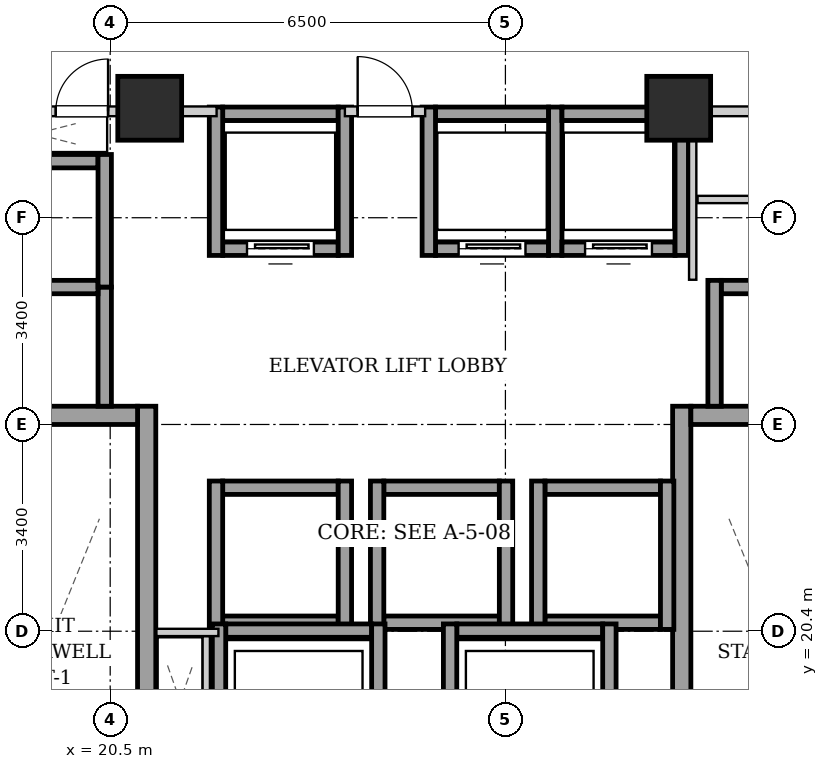
"""IFC4 building model, lengths in metres.
Left out: names, types, materials, properties, quantities, classifications, styles, units other than length and angle.
Written with IfcOpenShell. Run it as: python <this file> out.ifc"""

import sys

from ifc_helpers import new_model, si_unit, direction, frame, frame_2d, origin, origin_2d, place, context, subcontext, project, spatial, rectangle, extrude, element, fill, save


model = new_model("IFC4")
c1 = context("Model", 3, precision=1e-05, world=origin(), true_north=direction((0.0, 1.0)))
c2 = subcontext(c1, "Body", "Model", "MODEL_VIEW")
j1 = project(units=[si_unit("LENGTHUNIT", "METRE"), si_unit("PLANEANGLEUNIT", "RADIAN")], contexts=[c1])
p1 = place(None, origin())
s1 = spatial("IfcSite", under=j1, at=p1, CompositionType="ELEMENT")
p2 = place(p1, origin())
s2 = spatial("IfcBuilding", under=s1, at=p2, CompositionType="ELEMENT")
p3 = place(p2, frame((0.0, 0.0, 78.3)))
s3 = spatial("IfcBuildingStorey", under=s2, at=p3, CompositionType="ELEMENT", Elevation=78.3)
for number, where, z_axis, x_axis in (
    (1, (21.15, 29.0, 0.0), (0.0, 0.0, 1.0), (1.0, 0.0, 0.0)),
    (2, (29.85, 29.0, 0.0), (0.0, 0.0, 1.0), (1.0, 0.0, 0.0)),
):
    element("IfcColumn", number, at=place(p3, frame(where, z_axis=z_axis, x_axis=x_axis)), inside=s3, PredefinedType="COLUMN", context=c2, shape_type="SweptSolid", body=[
        extrude(rectangle(XDim=1.05, YDim=1.05, at=origin_2d()), origin(), (0.0, 0.0, 1.0), 3.2),
    ])
p4 = place(p3, frame((21.1, 15.1, 0.0), z_axis=(0.0, 0.0, 1.0), x_axis=(0.0, 1.0, 0.0)))
e3 = element("IfcWall", 3, at=p4, inside=s3, PredefinedType="SHEAR", context=c2, shape_type="SweptSolid", body=[
    extrude(rectangle(XDim=9.0, YDim=0.3, at=frame_2d((4.5, 0.0))), origin(), (0.0, 0.0, 1.0), 2.94),
])
p5 = place(p3, frame((18.1, 23.95, 0.0), z_axis=(0.0, 0.0, 1.0), x_axis=(1.0, 0.0, 0.0)))
e4 = element("IfcWall", 4, at=p5, inside=s3, PredefinedType="SHEAR", context=c2, shape_type="SweptSolid", body=[
    extrude(rectangle(XDim=2.85, YDim=0.3, at=frame_2d((1.425, 0.0))), origin(), (0.0, 0.0, 1.0), 2.94),
])
p6 = place(p3, frame((29.9, 15.1, 0.0), z_axis=(0.0, 0.0, 1.0), x_axis=(0.0, 1.0, 0.0)))
e5 = element("IfcWall", 5, at=p6, inside=s3, PredefinedType="SHEAR", context=c2, shape_type="SweptSolid", body=[
    extrude(rectangle(XDim=9.0, YDim=0.3, at=frame_2d((4.5, 0.0))), origin(), (0.0, 0.0, 1.0), 2.94),
])
p7 = place(p3, frame((30.05, 23.95, 0.0), z_axis=(0.0, 0.0, 1.0), x_axis=(1.0, 0.0, 0.0)))
e6 = element("IfcWall", 6, at=p7, inside=s3, PredefinedType="SHEAR", context=c2, shape_type="SweptSolid", body=[
    extrude(rectangle(XDim=2.85, YDim=0.3, at=frame_2d((1.425, 0.0))), origin(), (0.0, 0.0, 1.0), 2.94),
])
p8 = place(p3, frame((22.35, 26.69, 0.0), z_axis=(0.0, 0.0, 1.0), x_axis=(1.0, 0.0, 0.0)))
e7 = element("IfcWall", 7, at=p8, inside=s3, PredefinedType="SHEAR", context=c2, shape_type="SweptSolid", body=[
    extrude(rectangle(XDim=1.9, YDim=0.22, at=frame_2d((0.95, 0.0))), origin(), (0.0, 0.0, 1.0), 2.94),
])
p9 = place(p8, frame((0.4, 0.0, 0.0)))
e8 = element("IfcOpeningElement", 8, at=p9, cuts=e7, PredefinedType="OPENING", context=c2, shape_type="SweptSolid", body=[
    extrude(rectangle(XDim=1.1, YDim=2.15, at=frame_2d((0.55, 1.075))), frame((0.0, 0.12, 0.0), z_axis=(0.0, -1.0, 0.0), x_axis=(1.0, 0.0, 0.0)), (0.0, 0.0, 1.0), 0.24),
])
p10 = place(p3, frame((22.35, 28.91, 0.0), z_axis=(0.0, 0.0, 1.0), x_axis=(1.0, 0.0, 0.0)))
e9 = element("IfcWall", 9, at=p10, inside=s3, PredefinedType="SHEAR", context=c2, shape_type="SweptSolid", body=[
    extrude(rectangle(XDim=1.9, YDim=0.22, at=frame_2d((0.95, 0.0))), origin(), (0.0, 0.0, 1.0), 2.94),
])
for number, where, z_axis, x_axis in (
    (10, (22.24, 26.58, 0.0), (0.0, 0.0, 1.0), (0.0, 1.0, 0.0)),
    (11, (24.36, 26.58, 0.0), (0.0, 0.0, 1.0), (0.0, 1.0, 0.0)),
):
    element("IfcWall", number, at=place(p3, frame(where, z_axis=z_axis, x_axis=x_axis)), inside=s3, PredefinedType="SHEAR", context=c2, shape_type="SweptSolid", body=[
        extrude(rectangle(XDim=2.44, YDim=0.22, at=frame_2d((1.22, 0.0))), origin(), (0.0, 0.0, 1.0), 2.94),
    ])
p11 = place(p3, frame((25.85, 26.69, 0.0), z_axis=(0.0, 0.0, 1.0), x_axis=(1.0, 0.0, 0.0)))
e12 = element("IfcWall", 12, at=p11, inside=s3, PredefinedType="SHEAR", context=c2, shape_type="SweptSolid", body=[
    extrude(rectangle(XDim=1.86, YDim=0.22, at=frame_2d((0.93, 0.0))), origin(), (0.0, 0.0, 1.0), 2.94),
])
p12 = place(p11, frame((0.38, 0.0, 0.0)))
e13 = element("IfcOpeningElement", 13, at=p12, cuts=e12, PredefinedType="OPENING", context=c2, shape_type="SweptSolid", body=[
    extrude(rectangle(XDim=1.1, YDim=2.15, at=frame_2d((0.55, 1.075))), frame((0.0, 0.12, 0.0), z_axis=(0.0, -1.0, 0.0), x_axis=(1.0, 0.0, 0.0)), (0.0, 0.0, 1.0), 0.24),
])
p13 = place(p3, frame((25.85, 28.91, 0.0), z_axis=(0.0, 0.0, 1.0), x_axis=(1.0, 0.0, 0.0)))
e14 = element("IfcWall", 14, at=p13, inside=s3, PredefinedType="SHEAR", context=c2, shape_type="SweptSolid", body=[
    extrude(rectangle(XDim=1.86, YDim=0.22, at=frame_2d((0.93, 0.0))), origin(), (0.0, 0.0, 1.0), 2.94),
])
for number, where, z_axis, x_axis in (
    (15, (25.74, 26.58, 0.0), (0.0, 0.0, 1.0), (0.0, 1.0, 0.0)),
    (16, (27.82, 26.58, 0.0), (0.0, 0.0, 1.0), (0.0, 1.0, 0.0)),
):
    element("IfcWall", number, at=place(p3, frame(where, z_axis=z_axis, x_axis=x_axis)), inside=s3, PredefinedType="SHEAR", context=c2, shape_type="SweptSolid", body=[
        extrude(rectangle(XDim=2.44, YDim=0.22, at=frame_2d((1.22, 0.0))), origin(), (0.0, 0.0, 1.0), 2.94),
    ])
p14 = place(p3, frame((27.93, 26.69, 0.0), z_axis=(0.0, 0.0, 1.0), x_axis=(1.0, 0.0, 0.0)))
e17 = element("IfcWall", 17, at=p14, inside=s3, PredefinedType="SHEAR", context=c2, shape_type="SweptSolid", body=[
    extrude(rectangle(XDim=1.86, YDim=0.22, at=frame_2d((0.93, 0.0))), origin(), (0.0, 0.0, 1.0), 2.94),
])
p15 = place(p14, frame((0.38, 0.0, 0.0)))
e18 = element("IfcOpeningElement", 18, at=p15, cuts=e17, PredefinedType="OPENING", context=c2, shape_type="SweptSolid", body=[
    extrude(rectangle(XDim=1.1, YDim=2.15, at=frame_2d((0.55, 1.075))), frame((0.0, 0.12, 0.0), z_axis=(0.0, -1.0, 0.0), x_axis=(1.0, 0.0, 0.0)), (0.0, 0.0, 1.0), 0.24),
])
p16 = place(p3, frame((27.93, 28.91, 0.0), z_axis=(0.0, 0.0, 1.0), x_axis=(1.0, 0.0, 0.0)))
e19 = element("IfcWall", 19, at=p16, inside=s3, PredefinedType="SHEAR", context=c2, shape_type="SweptSolid", body=[
    extrude(rectangle(XDim=1.86, YDim=0.22, at=frame_2d((0.93, 0.0))), origin(), (0.0, 0.0, 1.0), 2.94),
])
p17 = place(p3, frame((29.9, 26.58, 0.0), z_axis=(0.0, 0.0, 1.0), x_axis=(0.0, 1.0, 0.0)))
e20 = element("IfcWall", 20, at=p17, inside=s3, PredefinedType="SHEAR", context=c2, shape_type="SweptSolid", body=[
    extrude(rectangle(XDim=2.44, YDim=0.22, at=frame_2d((1.22, 0.0))), origin(), (0.0, 0.0, 1.0), 2.94),
])
for number, where, z_axis, x_axis in (
    (21, (22.35, 20.54, 0.0), (0.0, 0.0, 1.0), (1.0, 0.0, 0.0)),
    (22, (22.35, 22.76, 0.0), (0.0, 0.0, 1.0), (1.0, 0.0, 0.0)),
):
    element("IfcWall", number, at=place(p3, frame(where, z_axis=z_axis, x_axis=x_axis)), inside=s3, PredefinedType="SHEAR", context=c2, shape_type="SweptSolid", body=[
        extrude(rectangle(XDim=1.9, YDim=0.22, at=frame_2d((0.95, 0.0))), origin(), (0.0, 0.0, 1.0), 2.94),
    ])
for number, where, z_axis, x_axis in (
    (23, (22.24, 20.43, 0.0), (0.0, 0.0, 1.0), (0.0, 1.0, 0.0)),
    (24, (24.36, 20.43, 0.0), (0.0, 0.0, 1.0), (0.0, 1.0, 0.0)),
):
    element("IfcWall", number, at=place(p3, frame(where, z_axis=z_axis, x_axis=x_axis)), inside=s3, PredefinedType="SHEAR", context=c2, shape_type="SweptSolid", body=[
        extrude(rectangle(XDim=2.44, YDim=0.22, at=frame_2d((1.22, 0.0))), origin(), (0.0, 0.0, 1.0), 2.94),
    ])
for number, where, z_axis, x_axis in (
    (25, (25.0, 20.54, 0.0), (0.0, 0.0, 1.0), (1.0, 0.0, 0.0)),
    (26, (25.0, 22.76, 0.0), (0.0, 0.0, 1.0), (1.0, 0.0, 0.0)),
):
    element("IfcWall", number, at=place(p3, frame(where, z_axis=z_axis, x_axis=x_axis)), inside=s3, PredefinedType="SHEAR", context=c2, shape_type="SweptSolid", body=[
        extrude(rectangle(XDim=1.9, YDim=0.22, at=frame_2d((0.95, 0.0))), origin(), (0.0, 0.0, 1.0), 2.94),
    ])
for number, where, z_axis, x_axis in (
    (27, (24.89, 20.43, 0.0), (0.0, 0.0, 1.0), (0.0, 1.0, 0.0)),
    (28, (27.01, 20.43, 0.0), (0.0, 0.0, 1.0), (0.0, 1.0, 0.0)),
):
    element("IfcWall", number, at=place(p3, frame(where, z_axis=z_axis, x_axis=x_axis)), inside=s3, PredefinedType="SHEAR", context=c2, shape_type="SweptSolid", body=[
        extrude(rectangle(XDim=2.44, YDim=0.22, at=frame_2d((1.22, 0.0))), origin(), (0.0, 0.0, 1.0), 2.94),
    ])
for number, where, z_axis, x_axis in (
    (29, (27.65, 20.54, 0.0), (0.0, 0.0, 1.0), (1.0, 0.0, 0.0)),
    (30, (27.65, 22.76, 0.0), (0.0, 0.0, 1.0), (1.0, 0.0, 0.0)),
):
    element("IfcWall", number, at=place(p3, frame(where, z_axis=z_axis, x_axis=x_axis)), inside=s3, PredefinedType="SHEAR", context=c2, shape_type="SweptSolid", body=[
        extrude(rectangle(XDim=1.9, YDim=0.22, at=frame_2d((0.95, 0.0))), origin(), (0.0, 0.0, 1.0), 2.94),
    ])
for number, where, z_axis, x_axis in (
    (31, (27.54, 20.43, 0.0), (0.0, 0.0, 1.0), (0.0, 1.0, 0.0)),
    (32, (29.66, 20.43, 0.0), (0.0, 0.0, 1.0), (0.0, 1.0, 0.0)),
):
    element("IfcWall", number, at=place(p3, frame(where, z_axis=z_axis, x_axis=x_axis)), inside=s3, PredefinedType="SHEAR", context=c2, shape_type="SweptSolid", body=[
        extrude(rectangle(XDim=2.44, YDim=0.22, at=frame_2d((1.22, 0.0))), origin(), (0.0, 0.0, 1.0), 2.94),
    ])
p18 = place(p3, frame((20.41, 24.1, 0.0), z_axis=(0.0, 0.0, 1.0), x_axis=(0.0, 1.0, 0.0)))
e33 = element("IfcWall", 33, at=p18, inside=s3, PredefinedType="SHEAR", context=c2, shape_type="SweptSolid", body=[
    extrude(rectangle(XDim=1.96, YDim=0.22, at=frame_2d((0.98, 0.0))), origin(), (0.0, 0.0, 1.0), 2.94),
])
for number, where, z_axis, x_axis in (
    (34, (18.4, 26.06, 0.0), (0.0, 0.0, 1.0), (1.0, 0.0, 0.0)),
    (35, (18.4, 28.13, 0.0), (0.0, 0.0, 1.0), (1.0, 0.0, 0.0)),
):
    element("IfcWall", number, at=place(p3, frame(where, z_axis=z_axis, x_axis=x_axis)), inside=s3, PredefinedType="SHEAR", context=c2, shape_type="SweptSolid", body=[
        extrude(rectangle(XDim=1.9, YDim=0.22, at=frame_2d((0.95, 0.0))), origin(), (0.0, 0.0, 1.0), 2.94),
    ])
p19 = place(p3, frame((20.41, 26.06, 0.0), z_axis=(0.0, 0.0, 1.0), x_axis=(0.0, 1.0, 0.0)))
e36 = element("IfcWall", 36, at=p19, inside=s3, PredefinedType="SHEAR", context=c2, shape_type="SweptSolid", body=[
    extrude(rectangle(XDim=2.18, YDim=0.22, at=frame_2d((1.09, 0.0))), origin(), (0.0, 0.0, 1.0), 2.94),
])
p20 = place(p3, frame((30.55, 26.06, 0.0), z_axis=(0.0, 0.0, 1.0), x_axis=(1.0, 0.0, 0.0)))
e37 = element("IfcWall", 37, at=p20, inside=s3, PredefinedType="SHEAR", context=c2, shape_type="SweptSolid", body=[
    extrude(rectangle(XDim=1.9, YDim=0.22, at=frame_2d((0.95, 0.0))), origin(), (0.0, 0.0, 1.0), 2.94),
])
p21 = place(p3, frame((30.44, 24.1, 0.0), z_axis=(0.0, 0.0, 1.0), x_axis=(0.0, 1.0, 0.0)))
e38 = element("IfcWall", 38, at=p21, inside=s3, PredefinedType="SHEAR", context=c2, shape_type="SweptSolid", body=[
    extrude(rectangle(XDim=2.07, YDim=0.22, at=frame_2d((1.035, 0.0))), origin(), (0.0, 0.0, 1.0), 2.94),
])
p22 = place(p3, frame((22.4, 20.41, 0.0), z_axis=(0.0, 0.0, 1.0), x_axis=(1.0, 0.0, 0.0)))
e39 = element("IfcWall", 39, at=p22, inside=s3, PredefinedType="SHEAR", context=c2, shape_type="SweptSolid", body=[
    extrude(rectangle(XDim=2.4, YDim=0.22, at=frame_2d((1.2, 0.0))), origin(), (0.0, 0.0, 1.0), 2.94),
])
for number, where, z_axis, x_axis in (
    (40, (22.29, 17.98, 0.0), (0.0, 0.0, 1.0), (0.0, 1.0, 0.0)),
    (41, (24.91, 17.98, 0.0), (0.0, 0.0, 1.0), (0.0, 1.0, 0.0)),
):
    element("IfcWall", number, at=place(p3, frame(where, z_axis=z_axis, x_axis=x_axis)), inside=s3, PredefinedType="SHEAR", context=c2, shape_type="SweptSolid", body=[
        extrude(rectangle(XDim=2.54, YDim=0.22, at=frame_2d((1.27, 0.0))), origin(), (0.0, 0.0, 1.0), 2.94),
    ])
p23 = place(p3, frame((26.2, 20.41, 0.0), z_axis=(0.0, 0.0, 1.0), x_axis=(1.0, 0.0, 0.0)))
e42 = element("IfcWall", 42, at=p23, inside=s3, PredefinedType="SHEAR", context=c2, shape_type="SweptSolid", body=[
    extrude(rectangle(XDim=2.4, YDim=0.22, at=frame_2d((1.2, 0.0))), origin(), (0.0, 0.0, 1.0), 2.94),
])
for number, where, z_axis, x_axis in (
    (43, (26.09, 17.98, 0.0), (0.0, 0.0, 1.0), (0.0, 1.0, 0.0)),
    (44, (28.71, 17.98, 0.0), (0.0, 0.0, 1.0), (0.0, 1.0, 0.0)),
):
    element("IfcWall", number, at=place(p3, frame(where, z_axis=z_axis, x_axis=x_axis)), inside=s3, PredefinedType="SHEAR", context=c2, shape_type="SweptSolid", body=[
        extrude(rectangle(XDim=2.54, YDim=0.22, at=frame_2d((1.27, 0.0))), origin(), (0.0, 0.0, 1.0), 2.94),
    ])
p24 = place(p3, frame((24.36, 28.95, 0.0), z_axis=(0.0, 0.0, 1.0), x_axis=(1.0, 0.0, 0.0)))
e45 = element("IfcWall", 45, at=p24, inside=s3, PredefinedType="PARTITIONING", context=c2, shape_type="SweptSolid", body=[
    extrude(rectangle(XDim=1.32, YDim=0.16, at=frame_2d((0.66, 0.0))), origin(), (0.0, 0.0, 1.0), 2.309),
])
p25 = place(p24, frame((0.21, 0.0, 0.0)))
e46 = element("IfcOpeningElement", 46, at=p25, cuts=e45, PredefinedType="OPENING", context=c2, shape_type="SweptSolid", body=[
    extrude(rectangle(XDim=0.9, YDim=2.05, at=frame_2d((0.45, 1.025))), frame((0.0, 0.09, 0.0), z_axis=(0.0, -1.0, 0.0), x_axis=(1.0, 0.0, 0.0)), (0.0, 0.0, 1.0), 0.18),
])
p26 = place(p3, frame((17.96, 28.95, 0.0), z_axis=(0.0, 0.0, 1.0), x_axis=(1.0, 0.0, 0.0)))
e47 = element("IfcWall", 47, at=p26, inside=s3, PredefinedType="PARTITIONING", context=c2, shape_type="SweptSolid", body=[
    extrude(rectangle(XDim=4.29, YDim=0.16, at=frame_2d((2.145, 0.0))), origin(), (0.0, 0.0, 1.0), 2.309),
])
p27 = place(p26, frame((1.645, 0.0, 0.0)))
e48 = element("IfcOpeningElement", 48, at=p27, cuts=e47, PredefinedType="OPENING", context=c2, shape_type="SweptSolid", body=[
    extrude(rectangle(XDim=0.86, YDim=2.05, at=frame_2d((0.43, 1.025))), frame((0.0, 0.09, 0.0), z_axis=(0.0, -1.0, 0.0), x_axis=(1.0, 0.0, 0.0)), (0.0, 0.0, 1.0), 0.18),
])
p28 = place(p3, frame((22.08, 18.2, 0.0), z_axis=(0.0, 0.0, 1.0), x_axis=(0.0, 1.0, 0.0)))
e49 = element("IfcWall", 49, at=p28, inside=s3, PredefinedType="PARTITIONING", context=c2, shape_type="SweptSolid", body=[
    extrude(rectangle(XDim=2.12, YDim=0.12, at=frame_2d((1.06, 0.0))), origin(), (0.0, 0.0, 1.0), 2.94),
])
p29 = place(p3, frame((22.28, 20.38, 0.0), z_axis=(0.0, 0.0, 1.0), x_axis=(-1.0, 0.0, 0.0)))
e50 = element("IfcWall", 50, at=p29, inside=s3, PredefinedType="PARTITIONING", context=c2, shape_type="SweptSolid", body=[
    extrude(rectangle(XDim=1.02, YDim=0.12, at=frame_2d((0.51, 0.0))), origin(), (0.0, 0.0, 1.0), 2.94),
])
p30 = place(p3, frame((30.08, 26.18, 0.0), z_axis=(0.0, 0.0, 1.0), x_axis=(0.0, 1.0, 0.0)))
e51 = element("IfcWall", 51, at=p30, inside=s3, PredefinedType="PARTITIONING", context=c2, shape_type="SweptSolid", body=[
    extrude(rectangle(XDim=2.68, YDim=0.12, at=frame_2d((1.34, 0.0))), origin(), (0.0, 0.0, 1.0), 2.94),
])
p31 = place(p3, frame((30.16, 27.5, 0.0), z_axis=(0.0, 0.0, 1.0), x_axis=(1.0, 0.0, 0.0)))
e52 = element("IfcWall", 52, at=p31, inside=s3, PredefinedType="PARTITIONING", context=c2, shape_type="SweptSolid", body=[
    extrude(rectangle(XDim=2.88, YDim=0.12, at=frame_2d((1.44, 0.0))), origin(), (0.0, 0.0, 1.0), 2.94),
])
p32 = place(p31, frame((0.97, 0.0, 0.0)))
e53 = element("IfcOpeningElement", 53, at=p32, cuts=e52, PredefinedType="OPENING", context=c2, shape_type="SweptSolid", body=[
    extrude(rectangle(XDim=0.86, YDim=2.05, at=frame_2d((0.43, 1.025))), frame((0.0, 0.07, 0.0), z_axis=(0.0, -1.0, 0.0), x_axis=(1.0, 0.0, 0.0)), (0.0, 0.0, 1.0), 0.14),
])
p33 = place(p3, frame((30.08, 28.95, 0.0), z_axis=(0.0, 0.0, 1.0), x_axis=(1.0, 0.0, 0.0)))
e54 = element("IfcWall", 54, at=p33, inside=s3, PredefinedType="PARTITIONING", context=c2, shape_type="SweptSolid", body=[
    extrude(rectangle(XDim=2.96, YDim=0.16, at=frame_2d((1.48, 0.0))), origin(), (0.0, 0.0, 1.0), 2.94),
])
p34 = place(p33, frame((1.045, 0.0, 0.0)))
e55 = element("IfcOpeningElement", 55, at=p34, cuts=e54, PredefinedType="OPENING", context=c2, shape_type="SweptSolid", body=[
    extrude(rectangle(XDim=0.86, YDim=2.05, at=frame_2d((0.43, 1.025))), frame((0.0, 0.09, 0.0), z_axis=(0.0, -1.0, 0.0), x_axis=(1.0, 0.0, 0.0)), (0.0, 0.0, 1.0), 0.18),
])
p35 = place(p9, origin())
e56 = element("IfcDoor", 56, at=p35, inside=s3, OperationType="SLIDING_TO_LEFT", PredefinedType="DOOR", context=c2, shape_type="SweptSolid", body=[
    extrude(rectangle(XDim=1.1, YDim=2.15, at=frame_2d((0.55, 1.075))), frame((0.0, 0.025, 0.0), z_axis=(0.0, -1.0, 0.0), x_axis=(1.0, 0.0, 0.0)), (0.0, 0.0, 1.0), 0.05),
])
fill(e8, e56)
p36 = place(p12, origin())
e57 = element("IfcDoor", 57, at=p36, inside=s3, OperationType="SLIDING_TO_LEFT", PredefinedType="DOOR", context=c2, shape_type="SweptSolid", body=[
    extrude(rectangle(XDim=1.1, YDim=2.15, at=frame_2d((0.55, 1.075))), frame((0.0, 0.025, 0.0), z_axis=(0.0, -1.0, 0.0), x_axis=(1.0, 0.0, 0.0)), (0.0, 0.0, 1.0), 0.05),
])
fill(e13, e57)
p37 = place(p15, origin())
e58 = element("IfcDoor", 58, at=p37, inside=s3, OperationType="SLIDING_TO_LEFT", PredefinedType="DOOR", context=c2, shape_type="SweptSolid", body=[
    extrude(rectangle(XDim=1.1, YDim=2.15, at=frame_2d((0.55, 1.075))), frame((0.0, 0.025, 0.0), z_axis=(0.0, -1.0, 0.0), x_axis=(1.0, 0.0, 0.0)), (0.0, 0.0, 1.0), 0.05),
])
fill(e18, e58)
p38 = place(p25, origin())
e59 = element("IfcDoor", 59, at=p38, inside=s3, OperationType="SINGLE_SWING_LEFT", PredefinedType="DOOR", context=c2, shape_type="SweptSolid", body=[
    extrude(rectangle(XDim=0.9, YDim=2.05, at=frame_2d((0.45, 1.025))), frame((0.0, 0.025, 0.0), z_axis=(0.0, -1.0, 0.0), x_axis=(1.0, 0.0, 0.0)), (0.0, 0.0, 1.0), 0.05),
])
fill(e46, e59)
p39 = place(p27, origin())
e60 = element("IfcDoor", 60, at=p39, inside=s3, OperationType="SINGLE_SWING_RIGHT", PredefinedType="DOOR", context=c2, shape_type="SweptSolid", body=[
    extrude(rectangle(XDim=0.86, YDim=2.05, at=frame_2d((0.43, 1.025))), frame((0.0, 0.025, 0.0), z_axis=(0.0, -1.0, 0.0), x_axis=(1.0, 0.0, 0.0)), (0.0, 0.0, 1.0), 0.05),
])
fill(e48, e60)
save(model, sys.argv[1])
